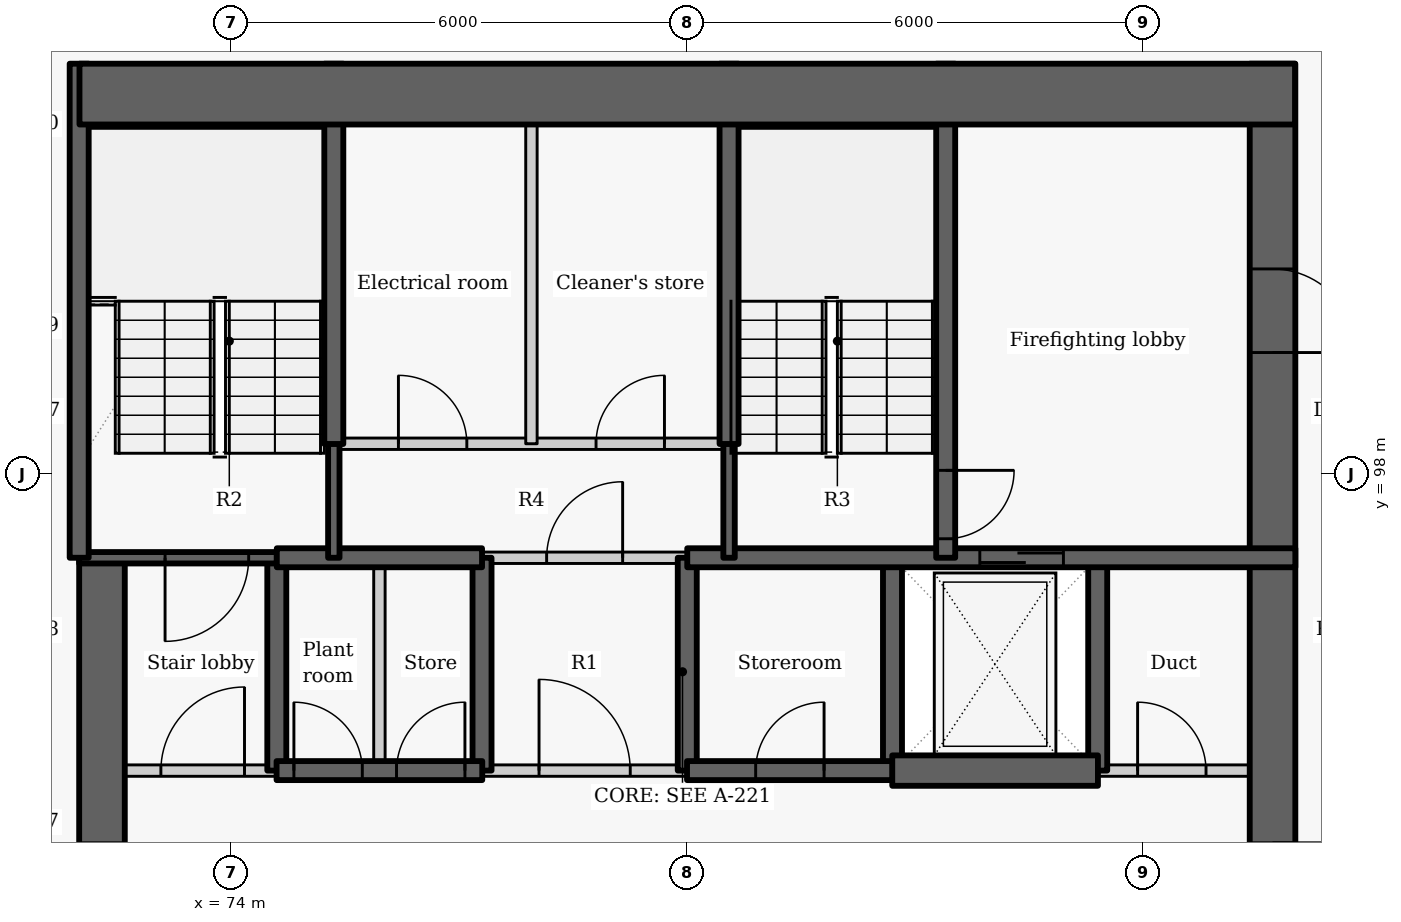
"""IFC4 building model, lengths in metres.
Left out: names, types, materials, properties, quantities, classifications, styles, units other than length and angle.
Written with IfcOpenShell. Run it as: python <this file> out.ifc"""

import sys

from ifc_helpers import new_model, si_unit, direction, frame, frame_2d, origin, place, context, subcontext, project, spatial, rectangle, extrude, element, fill, save


model = new_model("IFC4")
c1 = context("Model", 3, precision=1e-05, world=origin(), true_north=direction((0.0, 1.0)))
c2 = subcontext(c1, "Body", "Model", "MODEL_VIEW")
j1 = project(units=[si_unit("LENGTHUNIT", "METRE"), si_unit("PLANEANGLEUNIT", "RADIAN")], contexts=[c1])
p1 = place(None, origin())
s1 = spatial("IfcSite", under=j1, at=p1, CompositionType="ELEMENT")
p2 = place(p1, origin())
s2 = spatial("IfcBuilding", under=s1, at=p2, CompositionType="ELEMENT")
p3 = place(p2, frame((0.0, 0.0, 114.0)))
s3 = spatial("IfcBuildingStorey", under=s2, at=p3, CompositionType="ELEMENT", Elevation=114.0)
p4 = place(p3, frame((74.6, 94.1, -0.275), z_axis=(0.0, 0.0, 1.0), x_axis=(0.0, 1.0, 0.0)))
e1 = element("IfcWall", 1, at=p4, inside=s3, PredefinedType="SHEAR", context=c2, shape_type="SweptSolid", body=[
    extrude(rectangle(XDim=2.8, YDim=0.25, at=frame_2d((1.4, 0.0))), origin(), (0.0, 0.0, 1.0), 3.3),
])
p5 = place(p3, frame((72.3, 87.8, -0.275), z_axis=(0.0, 0.0, 1.0), x_axis=(0.0, 1.0, 0.0)))
e2 = element("IfcWall", 2, at=p5, inside=s3, PredefinedType="SHEAR", context=c2, shape_type="SweptSolid", body=[
    extrude(rectangle(XDim=9.1, YDim=0.6, at=frame_2d((4.55, 0.0))), origin(), (0.0, 0.0, 1.0), 3.3),
])
p6 = place(p5, frame((3.85, 0.0, 0.275)))
e3 = element("IfcOpeningElement", 3, at=p6, cuts=e2, PredefinedType="OPENING", context=c2, shape_type="SweptSolid", body=[
    extrude(rectangle(XDim=1.5, YDim=2.1, at=frame_2d((0.75, 1.05))), frame((0.0, 0.31, 0.0), z_axis=(0.0, -1.0, 0.0), x_axis=(1.0, 0.0, 0.0)), (0.0, 0.0, 1.0), 0.62),
])
for number, where, z_axis, x_axis in (
    (4, (77.3, 94.1, -0.275), (0.0, 0.0, 1.0), (0.0, 1.0, 0.0)),
    (5, (80.0, 94.1, -0.275), (0.0, 0.0, 1.0), (0.0, 1.0, 0.0)),
    (6, (82.7, 94.1, -0.275), (0.0, 0.0, 1.0), (0.0, 1.0, 0.0)),
    (7, (85.4, 94.1, -0.275), (0.0, 0.0, 1.0), (0.0, 1.0, 0.0)),
):
    element("IfcWall", number, at=place(p3, frame(where, z_axis=z_axis, x_axis=x_axis)), inside=s3, PredefinedType="SHEAR", context=c2, shape_type="SweptSolid", body=[
        extrude(rectangle(XDim=2.8, YDim=0.25, at=frame_2d((1.4, 0.0))), origin(), (0.0, 0.0, 1.0), 3.3),
    ])
p7 = place(p3, frame((87.7, 103.4, -0.275), z_axis=(0.0, 0.0, 1.0), x_axis=(0.0, -1.0, 0.0)))
e8 = element("IfcWall", 8, at=p7, inside=s3, PredefinedType="SHEAR", context=c2, shape_type="SweptSolid", body=[
    extrude(rectangle(XDim=15.6, YDim=0.6, at=frame_2d((7.8, 0.0))), origin(), (0.0, 0.0, 1.0), 3.3),
])
p8 = place(p7, frame((10.25, 0.0, 0.275)))
e9 = element("IfcOpeningElement", 9, at=p8, cuts=e8, PredefinedType="OPENING", context=c2, shape_type="SweptSolid", body=[
    extrude(rectangle(XDim=1.5, YDim=2.1, at=frame_2d((0.75, 1.05))), frame((0.0, 0.31, 0.0), z_axis=(0.0, -1.0, 0.0), x_axis=(1.0, 0.0, 0.0)), (0.0, 0.0, 1.0), 0.62),
])
p9 = place(p7, frame((2.7, 0.0, 0.275)))
e10 = element("IfcOpeningElement", 10, at=p9, cuts=e8, PredefinedType="OPENING", context=c2, shape_type="SweptSolid", body=[
    extrude(rectangle(XDim=1.1, YDim=2.1, at=frame_2d((0.55, 1.05))), frame((0.0, 0.31, 0.0), z_axis=(0.0, -1.0, 0.0), x_axis=(1.0, 0.0, 0.0)), (0.0, 0.0, 1.0), 0.62),
])
p10 = place(p3, frame((72.0, 94.1, 0.0), z_axis=(0.0, 0.0, 1.0), x_axis=(1.0, 0.0, 0.0)))
e11 = element("IfcWall", 11, at=p10, inside=s3, PredefinedType="PARTITIONING", context=c2, shape_type="SweptSolid", body=[
    extrude(rectangle(XDim=2.603, YDim=0.15, at=frame_2d((1.302, 0.0))), origin(), (0.0, 0.0, 1.0), 3.025),
])
p11 = place(p10, frame((1.075, 0.0, 0.0)))
e12 = element("IfcOpeningElement", 12, at=p11, cuts=e11, PredefinedType="OPENING", context=c2, shape_type="SweptSolid", body=[
    extrude(rectangle(XDim=1.1, YDim=2.1, at=frame_2d((0.55, 1.05))), frame((0.0, 0.085, 0.0), z_axis=(0.0, -1.0, 0.0), x_axis=(1.0, 0.0, 0.0)), (0.0, 0.0, 1.0), 0.17),
])
p12 = place(p3, frame((77.297, 94.1, 0.0), z_axis=(0.0, 0.0, 1.0), x_axis=(1.0, 0.0, 0.0)))
e13 = element("IfcWall", 13, at=p12, inside=s3, PredefinedType="PARTITIONING", context=c2, shape_type="SweptSolid", body=[
    extrude(rectangle(XDim=2.706, YDim=0.15, at=frame_2d((1.353, 0.0))), origin(), (0.0, 0.0, 1.0), 3.025),
])
p13 = place(p12, frame((0.753, 0.0, 0.0)))
e14 = element("IfcOpeningElement", 14, at=p13, cuts=e13, PredefinedType="OPENING", context=c2, shape_type="SweptSolid", body=[
    extrude(rectangle(XDim=1.2, YDim=2.1, at=frame_2d((0.6, 1.05))), frame((0.0, 0.085, 0.0), z_axis=(0.0, -1.0, 0.0), x_axis=(1.0, 0.0, 0.0)), (0.0, 0.0, 1.0), 0.17),
])
p14 = place(p3, frame((85.397, 94.1, 0.0), z_axis=(0.0, 0.0, 1.0), x_axis=(1.0, 0.0, 0.0)))
e15 = element("IfcWall", 15, at=p14, inside=s3, PredefinedType="PARTITIONING", context=c2, shape_type="SweptSolid", body=[
    extrude(rectangle(XDim=2.603, YDim=0.15, at=frame_2d((1.302, 0.0))), origin(), (0.0, 0.0, 1.0), 3.025),
])
p15 = place(p14, frame((0.528, 0.0, 0.0)))
e16 = element("IfcOpeningElement", 16, at=p15, cuts=e15, PredefinedType="OPENING", context=c2, shape_type="SweptSolid", body=[
    extrude(rectangle(XDim=0.9, YDim=2.1, at=frame_2d((0.45, 1.05))), frame((0.0, 0.085, 0.0), z_axis=(0.0, -1.0, 0.0), x_axis=(1.0, 0.0, 0.0)), (0.0, 0.0, 1.0), 0.17),
])
p16 = place(p3, frame((74.597, 94.1, -0.275), z_axis=(0.0, 0.0, 1.0), x_axis=(1.0, 0.0, 0.0)))
e17 = element("IfcWall", 17, at=p16, inside=s3, PredefinedType="SHEAR", context=c2, shape_type="SweptSolid", body=[
    extrude(rectangle(XDim=2.706, YDim=0.25, at=frame_2d((1.353, 0.0))), origin(), (0.0, 0.0, 1.0), 3.3),
])
p17 = place(p16, frame((0.228, 0.0, 0.275)))
e18 = element("IfcOpeningElement", 18, at=p17, cuts=e17, PredefinedType="OPENING", context=c2, shape_type="SweptSolid", body=[
    extrude(rectangle(XDim=0.9, YDim=2.1, at=frame_2d((0.45, 1.05))), frame((0.0, 0.135, 0.0), z_axis=(0.0, -1.0, 0.0), x_axis=(1.0, 0.0, 0.0)), (0.0, 0.0, 1.0), 0.27),
])
p18 = place(p16, frame((1.578, 0.0, 0.275)))
e19 = element("IfcOpeningElement", 19, at=p18, cuts=e17, PredefinedType="OPENING", context=c2, shape_type="SweptSolid", body=[
    extrude(rectangle(XDim=0.9, YDim=2.1, at=frame_2d((0.45, 1.05))), frame((0.0, 0.135, 0.0), z_axis=(0.0, -1.0, 0.0), x_axis=(1.0, 0.0, 0.0)), (0.0, 0.0, 1.0), 0.27),
])
p19 = place(p3, frame((79.997, 94.1, -0.275), z_axis=(0.0, 0.0, 1.0), x_axis=(1.0, 0.0, 0.0)))
e20 = element("IfcWall", 20, at=p19, inside=s3, PredefinedType="SHEAR", context=c2, shape_type="SweptSolid", body=[
    extrude(rectangle(XDim=2.706, YDim=0.25, at=frame_2d((1.353, 0.0))), origin(), (0.0, 0.0, 1.0), 3.3),
])
p20 = place(p19, frame((0.903, 0.0, 0.275)))
e21 = element("IfcOpeningElement", 21, at=p20, cuts=e20, PredefinedType="OPENING", context=c2, shape_type="SweptSolid", body=[
    extrude(rectangle(XDim=0.9, YDim=2.1, at=frame_2d((0.45, 1.05))), frame((0.0, 0.135, 0.0), z_axis=(0.0, -1.0, 0.0), x_axis=(1.0, 0.0, 0.0)), (0.0, 0.0, 1.0), 0.27),
])
p21 = place(p3, frame((82.697, 94.1, -0.275), z_axis=(0.0, 0.0, 1.0), x_axis=(1.0, 0.0, 0.0)))
e22 = element("IfcWall", 22, at=p21, inside=s3, PredefinedType="SHEAR", context=c2, shape_type="SweptSolid", body=[
    extrude(rectangle(XDim=2.706, YDim=0.4, at=frame_2d((1.353, 0.0))), origin(), (0.0, 0.0, 1.0), 3.3),
])
p22 = place(p3, frame((74.6, 96.9, -0.275), z_axis=(0.0, 0.0, 1.0), x_axis=(-1.0, 0.0, 0.0)))
e23 = element("IfcWall", 23, at=p22, inside=s3, PredefinedType="SHEAR", context=c2, shape_type="SweptSolid", body=[
    extrude(rectangle(XDim=2.6, YDim=0.15, at=frame_2d((1.3, 0.0))), origin(), (0.0, 0.0, 1.0), 3.3),
])
p23 = place(p22, frame((0.37, 0.0, 0.275)))
e24 = element("IfcOpeningElement", 24, at=p23, cuts=e23, PredefinedType="OPENING", context=c2, shape_type="SweptSolid", body=[
    extrude(rectangle(XDim=1.1, YDim=2.1, at=frame_2d((0.55, 1.05))), frame((0.0, 0.085, 0.0), z_axis=(0.0, -1.0, 0.0), x_axis=(1.0, 0.0, 0.0)), (0.0, 0.0, 1.0), 0.17),
])
p24 = place(p3, frame((75.95, 94.1, 0.0), z_axis=(0.0, 0.0, 1.0), x_axis=(0.0, 1.0, 0.0)))
e25 = element("IfcWall", 25, at=p24, inside=s3, PredefinedType="PARTITIONING", context=c2, shape_type="SweptSolid", body=[
    extrude(rectangle(XDim=2.8, YDim=0.15, at=frame_2d((1.4, 0.0))), origin(), (0.0, 0.0, 1.0), 3.025),
])
p25 = place(p3, frame((74.6, 96.9, -0.275), z_axis=(0.0, 0.0, 1.0), x_axis=(1.0, 0.0, 0.0)))
e26 = element("IfcWall", 26, at=p25, inside=s3, PredefinedType="SHEAR", context=c2, shape_type="SweptSolid", body=[
    extrude(rectangle(XDim=2.7, YDim=0.25, at=frame_2d((1.35, 0.0))), origin(), (0.0, 0.0, 1.0), 3.3),
])
p26 = place(p3, frame((80.0, 96.9, -0.275), z_axis=(0.0, 0.0, 1.0), x_axis=(1.0, 0.0, 0.0)))
e27 = element("IfcWall", 27, at=p26, inside=s3, PredefinedType="SHEAR", context=c2, shape_type="SweptSolid", body=[
    extrude(rectangle(XDim=8.0, YDim=0.25, at=frame_2d((4.0, 0.0))), origin(), (0.0, 0.0, 1.0), 3.3),
])
p27 = place(p26, frame((3.849, 0.0, 0.275)))
e28 = element("IfcOpeningElement", 28, at=p27, cuts=e27, PredefinedType="OPENING", context=c2, shape_type="SweptSolid", body=[
    extrude(rectangle(XDim=1.1, YDim=2.1, at=frame_2d((0.55, 1.05))), frame((0.0, 0.135, 0.0), z_axis=(0.0, -1.0, 0.0), x_axis=(1.0, 0.0, 0.0)), (0.0, 0.0, 1.0), 0.27),
])
p28 = place(p3, frame((77.3, 96.9, 0.0), z_axis=(0.0, 0.0, 1.0), x_axis=(1.0, 0.0, 0.0)))
e29 = element("IfcWall", 29, at=p28, inside=s3, PredefinedType="PARTITIONING", context=c2, shape_type="SweptSolid", body=[
    extrude(rectangle(XDim=2.7, YDim=0.15, at=frame_2d((1.35, 0.0))), origin(), (0.0, 0.0, 1.0), 3.025),
])
p29 = place(p28, frame((0.85, 0.0, 0.0)))
e30 = element("IfcOpeningElement", 30, at=p29, cuts=e29, PredefinedType="OPENING", context=c2, shape_type="SweptSolid", body=[
    extrude(rectangle(XDim=1.0, YDim=2.1, at=frame_2d((0.5, 1.05))), frame((0.0, 0.085, 0.0), z_axis=(0.0, -1.0, 0.0), x_axis=(1.0, 0.0, 0.0)), (0.0, 0.0, 1.0), 0.17),
])
p30 = place(p3, frame((75.35, 96.9, -0.275), z_axis=(0.0, 0.0, 1.0), x_axis=(0.0, 1.0, 0.0)))
e31 = element("IfcWall", 31, at=p30, inside=s3, PredefinedType="SHEAR", context=c2, shape_type="SweptSolid", body=[
    extrude(rectangle(XDim=1.503, YDim=0.15, at=frame_2d((0.751, 0.0))), origin(), (0.0, 0.0, 1.0), 3.3),
])
p31 = place(p3, frame((75.35, 98.397, -0.275), z_axis=(0.0, 0.0, 1.0), x_axis=(0.0, 1.0, 0.0)))
e32 = element("IfcWall", 32, at=p31, inside=s3, PredefinedType="SHEAR", context=c2, shape_type="SweptSolid", body=[
    extrude(rectangle(XDim=5.003, YDim=0.25, at=frame_2d((2.501, 0.0))), origin(), (0.0, 0.0, 1.0), 3.3),
])
p32 = place(p3, frame((72.0, 96.9, -0.275), z_axis=(0.0, 0.0, 1.0), x_axis=(0.0, 1.0, 0.0)))
e33 = element("IfcWall", 33, at=p32, inside=s3, PredefinedType="SHEAR", context=c2, shape_type="SweptSolid", body=[
    extrude(rectangle(XDim=6.5, YDim=0.25, at=frame_2d((3.25, 0.0))), origin(), (0.0, 0.0, 1.0), 3.3),
])
p33 = place(p3, frame((83.4, 103.4, -0.275), z_axis=(0.0, 0.0, 1.0), x_axis=(0.0, -1.0, 0.0)))
e34 = element("IfcWall", 34, at=p33, inside=s3, PredefinedType="SHEAR", context=c2, shape_type="SweptSolid", body=[
    extrude(rectangle(XDim=6.5, YDim=0.25, at=frame_2d((3.25, 0.0))), origin(), (0.0, 0.0, 1.0), 3.3),
])
p34 = place(p33, frame((5.35, 0.0, 0.275)))
e35 = element("IfcOpeningElement", 35, at=p34, cuts=e34, PredefinedType="OPENING", context=c2, shape_type="SweptSolid", body=[
    extrude(rectangle(XDim=0.9, YDim=2.1, at=frame_2d((0.45, 1.05))), frame((0.0, 0.135, 0.0), z_axis=(0.0, -1.0, 0.0), x_axis=(1.0, 0.0, 0.0)), (0.0, 0.0, 1.0), 0.27),
])
p35 = place(p3, frame((80.55, 96.9, -0.275), z_axis=(0.0, 0.0, 1.0), x_axis=(0.0, 1.0, 0.0)))
e36 = element("IfcWall", 36, at=p35, inside=s3, PredefinedType="SHEAR", context=c2, shape_type="SweptSolid", body=[
    extrude(rectangle(XDim=1.503, YDim=0.15, at=frame_2d((0.751, 0.0))), origin(), (0.0, 0.0, 1.0), 3.3),
])
p36 = place(p3, frame((80.55, 98.397, -0.275), z_axis=(0.0, 0.0, 1.0), x_axis=(0.0, 1.0, 0.0)))
e37 = element("IfcWall", 37, at=p36, inside=s3, PredefinedType="SHEAR", context=c2, shape_type="SweptSolid", body=[
    extrude(rectangle(XDim=5.003, YDim=0.25, at=frame_2d((2.501, 0.0))), origin(), (0.0, 0.0, 1.0), 3.3),
])
p37 = place(p3, frame((75.35, 98.4, 0.0), z_axis=(0.0, 0.0, 1.0), x_axis=(1.0, 0.0, 0.0)))
e38 = element("IfcWall", 38, at=p37, inside=s3, PredefinedType="PARTITIONING", context=c2, shape_type="SweptSolid", body=[
    extrude(rectangle(XDim=5.2, YDim=0.15, at=frame_2d((2.6, 0.0))), origin(), (0.0, 0.0, 1.0), 3.025),
])
p38 = place(p37, frame((0.85, 0.0, 0.0)))
e39 = element("IfcOpeningElement", 39, at=p38, cuts=e38, PredefinedType="OPENING", context=c2, shape_type="SweptSolid", body=[
    extrude(rectangle(XDim=0.9, YDim=2.1, at=frame_2d((0.45, 1.05))), frame((0.0, 0.085, 0.0), z_axis=(0.0, -1.0, 0.0), x_axis=(1.0, 0.0, 0.0)), (0.0, 0.0, 1.0), 0.17),
])
p39 = place(p37, frame((3.45, 0.0, 0.0)))
e40 = element("IfcOpeningElement", 40, at=p39, cuts=e38, PredefinedType="OPENING", context=c2, shape_type="SweptSolid", body=[
    extrude(rectangle(XDim=0.9, YDim=2.1, at=frame_2d((0.45, 1.05))), frame((0.0, 0.085, 0.0), z_axis=(0.0, -1.0, 0.0), x_axis=(1.0, 0.0, 0.0)), (0.0, 0.0, 1.0), 0.17),
])
p40 = place(p3, frame((77.95, 98.4, 0.0), z_axis=(0.0, 0.0, 1.0), x_axis=(0.0, 1.0, 0.0)))
e41 = element("IfcWall", 41, at=p40, inside=s3, PredefinedType="PARTITIONING", context=c2, shape_type="SweptSolid", body=[
    extrude(rectangle(XDim=5.0, YDim=0.15, at=frame_2d((2.5, 0.0))), origin(), (0.0, 0.0, 1.0), 3.025),
])
p41 = place(p3, frame((72.004, 103.0, -0.275), z_axis=(0.0, 0.0, 1.0), x_axis=(1.0, 0.0, 0.0)))
e42 = element("IfcWall", 42, at=p41, inside=s3, PredefinedType="SHEAR", context=c2, shape_type="SweptSolid", body=[
    extrude(rectangle(XDim=15.992, YDim=0.8, at=frame_2d((7.996, 0.0))), origin(), (0.0, 0.0, 1.0), 3.3),
])
p42 = place(p11, origin())
e43 = element("IfcDoor", 43, at=p42, inside=s3, OperationType="SINGLE_SWING_RIGHT", PredefinedType="DOOR", context=c2, shape_type="SweptSolid", body=[
    extrude(rectangle(XDim=1.1, YDim=2.1, at=frame_2d((0.55, 1.05))), frame((0.0, 0.025, 0.0), z_axis=(0.0, -1.0, 0.0), x_axis=(1.0, 0.0, 0.0)), (0.0, 0.0, 1.0), 0.05),
])
fill(e12, e43)
p43 = place(p17, origin())
e44 = element("IfcDoor", 44, at=p43, inside=s3, OperationType="SINGLE_SWING_LEFT", PredefinedType="DOOR", context=c2, shape_type="SweptSolid", body=[
    extrude(rectangle(XDim=0.9, YDim=2.1, at=frame_2d((0.45, 1.05))), frame((0.0, 0.025, 0.0), z_axis=(0.0, -1.0, 0.0), x_axis=(1.0, 0.0, 0.0)), (0.0, 0.0, 1.0), 0.05),
])
fill(e18, e44)
p44 = place(p18, origin())
e45 = element("IfcDoor", 45, at=p44, inside=s3, OperationType="SINGLE_SWING_RIGHT", PredefinedType="DOOR", context=c2, shape_type="SweptSolid", body=[
    extrude(rectangle(XDim=0.9, YDim=2.1, at=frame_2d((0.45, 1.05))), frame((0.0, 0.025, 0.0), z_axis=(0.0, -1.0, 0.0), x_axis=(1.0, 0.0, 0.0)), (0.0, 0.0, 1.0), 0.05),
])
fill(e19, e45)
p45 = place(p13, origin())
e46 = element("IfcDoor", 46, at=p45, inside=s3, OperationType="DOUBLE_DOOR_SINGLE_SWING", PredefinedType="DOOR", context=c2, shape_type="SweptSolid", body=[
    extrude(rectangle(XDim=1.2, YDim=2.1, at=frame_2d((0.6, 1.05))), frame((0.0, 0.025, 0.0), z_axis=(0.0, -1.0, 0.0), x_axis=(1.0, 0.0, 0.0)), (0.0, 0.0, 1.0), 0.05),
])
fill(e14, e46)
p46 = place(p20, origin())
e47 = element("IfcDoor", 47, at=p46, inside=s3, OperationType="SINGLE_SWING_RIGHT", PredefinedType="DOOR", context=c2, shape_type="SweptSolid", body=[
    extrude(rectangle(XDim=0.9, YDim=2.1, at=frame_2d((0.45, 1.05))), frame((0.0, 0.025, 0.0), z_axis=(0.0, -1.0, 0.0), x_axis=(1.0, 0.0, 0.0)), (0.0, 0.0, 1.0), 0.05),
])
fill(e21, e47)
p47 = place(p27, origin())
e48 = element("IfcDoor", 48, at=p47, inside=s3, OperationType="SLIDING_TO_LEFT", PredefinedType="DOOR", context=c2, shape_type="SweptSolid", body=[
    extrude(rectangle(XDim=1.1, YDim=2.1, at=frame_2d((0.55, 1.05))), frame((0.0, 0.025, 0.0), z_axis=(0.0, -1.0, 0.0), x_axis=(1.0, 0.0, 0.0)), (0.0, 0.0, 1.0), 0.05),
])
fill(e28, e48)
p48 = place(p15, origin())
e49 = element("IfcDoor", 49, at=p48, inside=s3, OperationType="SINGLE_SWING_LEFT", PredefinedType="DOOR", context=c2, shape_type="SweptSolid", body=[
    extrude(rectangle(XDim=0.9, YDim=2.1, at=frame_2d((0.45, 1.05))), frame((0.0, 0.025, 0.0), z_axis=(0.0, -1.0, 0.0), x_axis=(1.0, 0.0, 0.0)), (0.0, 0.0, 1.0), 0.05),
])
fill(e16, e49)
p49 = place(p29, origin())
e50 = element("IfcDoor", 50, at=p49, inside=s3, OperationType="SINGLE_SWING_RIGHT", PredefinedType="DOOR", context=c2, shape_type="SweptSolid", body=[
    extrude(rectangle(XDim=1.0, YDim=2.1, at=frame_2d((0.5, 1.05))), frame((0.0, 0.025, 0.0), z_axis=(0.0, -1.0, 0.0), x_axis=(1.0, 0.0, 0.0)), (0.0, 0.0, 1.0), 0.05),
])
fill(e30, e50)
p50 = place(p38, origin())
e51 = element("IfcDoor", 51, at=p50, inside=s3, OperationType="SINGLE_SWING_LEFT", PredefinedType="DOOR", context=c2, shape_type="SweptSolid", body=[
    extrude(rectangle(XDim=0.9, YDim=2.1, at=frame_2d((0.45, 1.05))), frame((0.0, 0.025, 0.0), z_axis=(0.0, -1.0, 0.0), x_axis=(1.0, 0.0, 0.0)), (0.0, 0.0, 1.0), 0.05),
])
fill(e39, e51)
p51 = place(p39, origin())
e52 = element("IfcDoor", 52, at=p51, inside=s3, OperationType="SINGLE_SWING_RIGHT", PredefinedType="DOOR", context=c2, shape_type="SweptSolid", body=[
    extrude(rectangle(XDim=0.9, YDim=2.1, at=frame_2d((0.45, 1.05))), frame((0.0, 0.025, 0.0), z_axis=(0.0, -1.0, 0.0), x_axis=(1.0, 0.0, 0.0)), (0.0, 0.0, 1.0), 0.05),
])
fill(e40, e52)
p52 = place(p23, origin())
e53 = element("IfcDoor", 53, at=p52, inside=s3, OperationType="SINGLE_SWING_RIGHT", PredefinedType="DOOR", context=c2, shape_type="SweptSolid", body=[
    extrude(rectangle(XDim=1.1, YDim=2.1, at=frame_2d((0.55, 1.05))), frame((0.0, 0.025, 0.0), z_axis=(0.0, -1.0, 0.0), x_axis=(1.0, 0.0, 0.0)), (0.0, 0.0, 1.0), 0.05),
])
fill(e24, e53)
p53 = place(p34, origin())
e54 = element("IfcDoor", 54, at=p53, inside=s3, OperationType="SINGLE_SWING_LEFT", PredefinedType="DOOR", context=c2, shape_type="SweptSolid", body=[
    extrude(rectangle(XDim=0.9, YDim=2.1, at=frame_2d((0.45, 1.05))), frame((0.0, 0.025, 0.0), z_axis=(0.0, -1.0, 0.0), x_axis=(1.0, 0.0, 0.0)), (0.0, 0.0, 1.0), 0.05),
])
fill(e35, e54)
p54 = place(p6, origin())
e55 = element("IfcDoor", 55, at=p54, inside=s3, OperationType="DOUBLE_DOOR_SINGLE_SWING", PredefinedType="DOOR", context=c2, shape_type="SweptSolid", body=[
    extrude(rectangle(XDim=1.5, YDim=2.1, at=frame_2d((0.75, 1.05))), frame((0.0, 0.025, 0.0), z_axis=(0.0, -1.0, 0.0), x_axis=(1.0, 0.0, 0.0)), (0.0, 0.0, 1.0), 0.05),
])
fill(e3, e55)
p55 = place(p9, origin())
e56 = element("IfcDoor", 56, at=p55, inside=s3, OperationType="SINGLE_SWING_RIGHT", PredefinedType="DOOR", context=c2, shape_type="SweptSolid", body=[
    extrude(rectangle(XDim=1.1, YDim=2.1, at=frame_2d((0.55, 1.05))), frame((0.0, 0.025, 0.0), z_axis=(0.0, -1.0, 0.0), x_axis=(1.0, 0.0, 0.0)), (0.0, 0.0, 1.0), 0.05),
])
fill(e10, e56)
save(model, sys.argv[1])
